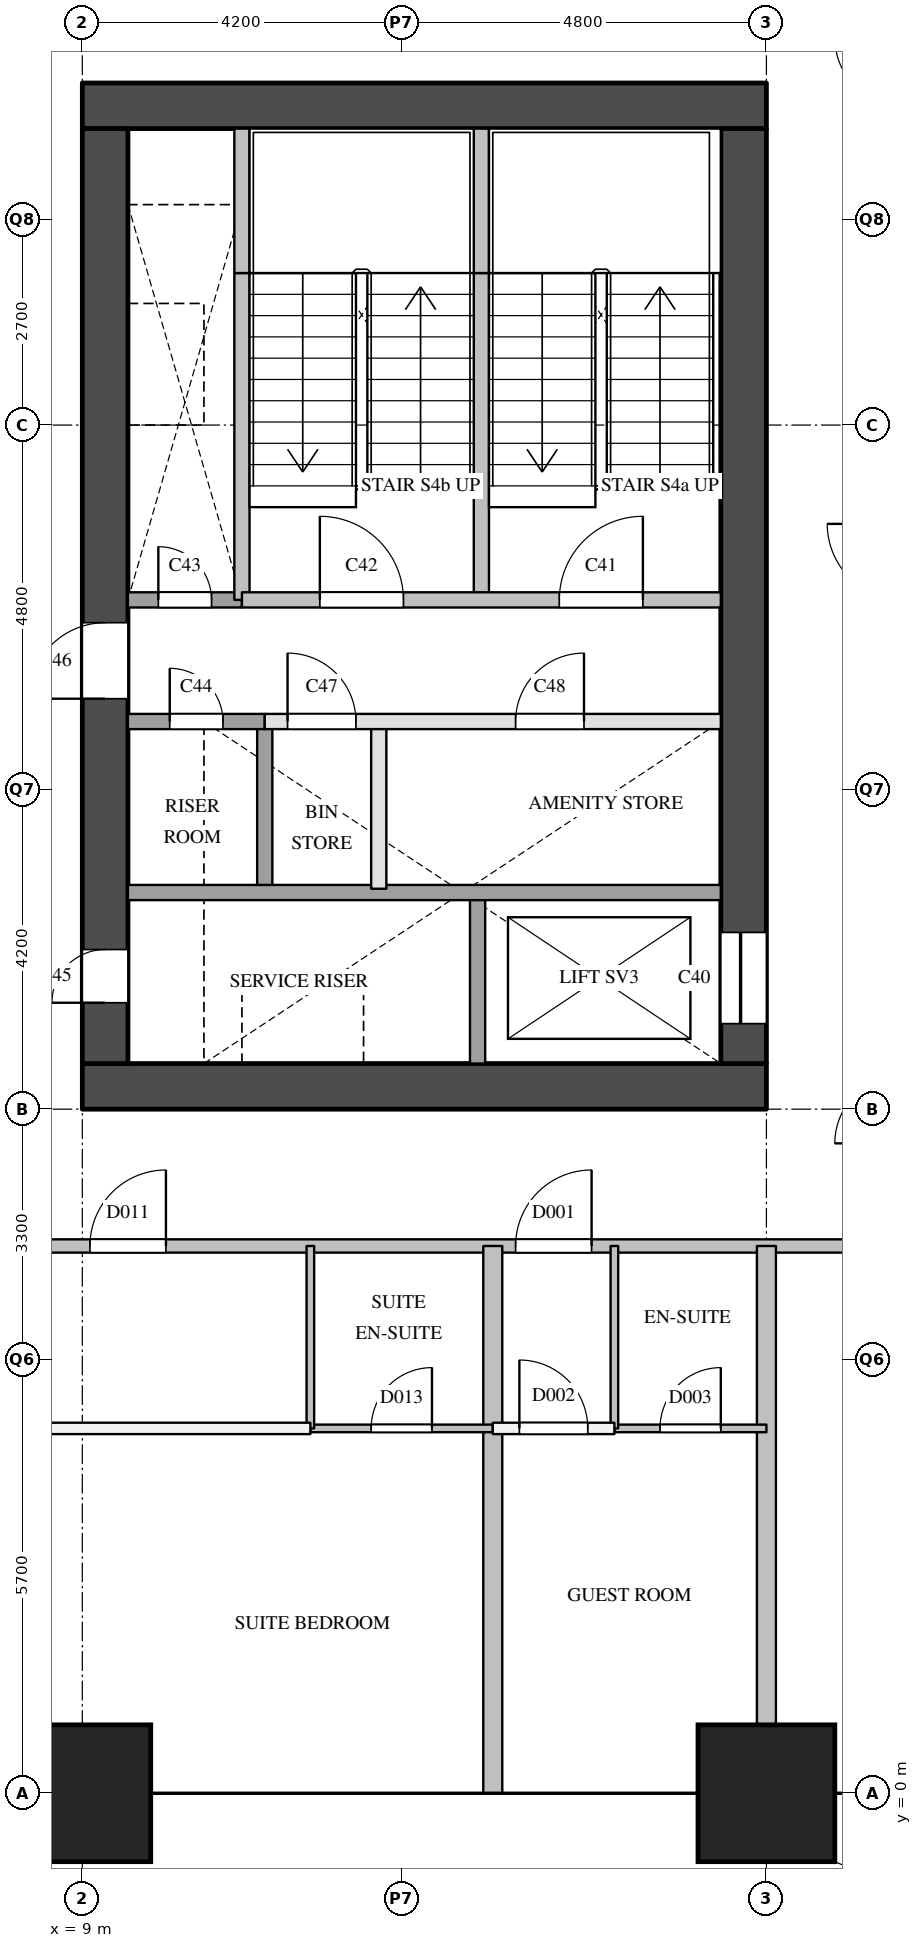
"""IFC4 building model, lengths in metres.
Left out: names, types, materials, properties, quantities, classifications, styles, units other than length and angle.
Written with IfcOpenShell. Run it as: python <this file> out.ifc"""

import sys

from ifc_helpers import new_model, si_unit, direction, frame, frame_2d, origin, origin_2d, place, context, subcontext, project, spatial, rectangle, extrude, element, fill, save


model = new_model("IFC4")
c1 = context("Model", 3, precision=1e-05, world=origin(), true_north=direction((0.0, 1.0)))
c2 = subcontext(c1, "Body", "Model", "MODEL_VIEW")
j1 = project(units=[si_unit("LENGTHUNIT", "METRE"), si_unit("PLANEANGLEUNIT", "RADIAN")], contexts=[c1])
p1 = place(None, origin())
s1 = spatial("IfcSite", under=j1, at=p1, CompositionType="ELEMENT")
p2 = place(p1, origin())
s2 = spatial("IfcBuilding", under=s1, at=p2, CompositionType="ELEMENT")
p3 = place(p2, frame((0.0, 0.0, 57.6)))
s3 = spatial("IfcBuildingStorey", under=s2, at=p3, CompositionType="ELEMENT", Elevation=57.6)
for number, where, z_axis, x_axis in (
    (1, (9.0, 0.0, 0.0), (0.0, 0.0, 1.0), (1.0, 0.0, 0.0)),
    (2, (18.0, 0.0, 0.0), (0.0, 0.0, 1.0), (1.0, 0.0, 0.0)),
):
    element("IfcColumn", number, at=place(p3, frame(where, z_axis=z_axis, x_axis=x_axis)), inside=s3, PredefinedType="COLUMN", context=c2, shape_type="SweptSolid", body=[
        extrude(rectangle(XDim=1.8, YDim=1.8, at=origin_2d()), origin(), (0.0, 0.0, 1.0), 3.8),
    ])
for number, where, z_axis, x_axis in (
    (3, (9.0, 9.3, 0.0), (0.0, 0.0, 1.0), (1.0, 0.0, 0.0)),
    (4, (9.0, 22.2, 0.0), (0.0, 0.0, 1.0), (1.0, 0.0, 0.0)),
):
    element("IfcWall", number, at=place(p3, frame(where, z_axis=z_axis, x_axis=x_axis)), inside=s3, PredefinedType="SHEAR", context=c2, shape_type="SweptSolid", body=[
        extrude(rectangle(XDim=9.0, YDim=0.6, at=frame_2d((4.5, 0.0))), origin(), (0.0, 0.0, 1.0), 3.5),
    ])
p4 = place(p3, frame((9.3, 9.6, 0.0), z_axis=(0.0, 0.0, 1.0), x_axis=(0.0, 1.0, 0.0)))
e5 = element("IfcWall", 5, at=p4, inside=s3, PredefinedType="SHEAR", context=c2, shape_type="SweptSolid", body=[
    extrude(rectangle(XDim=12.3, YDim=0.6, at=frame_2d((6.15, 0.0))), origin(), (0.0, 0.0, 1.0), 3.5),
])
p5 = place(p4, frame((0.8, 0.0, 0.0)))
e6 = element("IfcOpeningElement", 6, at=p5, cuts=e5, PredefinedType="OPENING", context=c2, shape_type="SweptSolid", body=[
    extrude(rectangle(XDim=0.7, YDim=2.1, at=frame_2d((0.35, 1.05))), frame((0.0, 0.31, 0.0), z_axis=(0.0, -1.0, 0.0), x_axis=(1.0, 0.0, 0.0)), (0.0, 0.0, 1.0), 0.62),
])
p6 = place(p4, frame((4.8, 0.0, 0.0)))
e7 = element("IfcOpeningElement", 7, at=p6, cuts=e5, PredefinedType="OPENING", context=c2, shape_type="SweptSolid", body=[
    extrude(rectangle(XDim=1.0, YDim=2.1, at=frame_2d((0.5, 1.05))), frame((0.0, 0.31, 0.0), z_axis=(0.0, -1.0, 0.0), x_axis=(1.0, 0.0, 0.0)), (0.0, 0.0, 1.0), 0.62),
])
p7 = place(p3, frame((17.7, 9.6, 0.0), z_axis=(0.0, 0.0, 1.0), x_axis=(0.0, 1.0, 0.0)))
e8 = element("IfcWall", 8, at=p7, inside=s3, PredefinedType="SHEAR", context=c2, shape_type="SweptSolid", body=[
    extrude(rectangle(XDim=12.3, YDim=0.6, at=frame_2d((6.15, 0.0))), origin(), (0.0, 0.0, 1.0), 3.5),
])
p8 = place(p7, frame((0.525, 0.0, 0.0)))
e9 = element("IfcOpeningElement", 9, at=p8, cuts=e8, PredefinedType="OPENING", context=c2, shape_type="SweptSolid", body=[
    extrude(rectangle(XDim=1.2, YDim=2.1, at=frame_2d((0.6, 1.05))), frame((0.0, 0.31, 0.0), z_axis=(0.0, -1.0, 0.0), x_axis=(1.0, 0.0, 0.0)), (0.0, 0.0, 1.0), 0.62),
])
p9 = place(p3, frame((11.1, 15.7, 0.0), z_axis=(0.0, 0.0, 1.0), x_axis=(0.0, 1.0, 0.0)))
e10 = element("IfcWall", 10, at=p9, inside=s3, PredefinedType="SOLIDWALL", context=c2, shape_type="SweptSolid", body=[
    extrude(rectangle(XDim=4.3, YDim=0.2, at=frame_2d((2.15, 0.0))), origin(), (0.0, 0.0, 1.0), 3.5),
])
p10 = place(p3, frame((11.1, 20.0, 0.0), z_axis=(0.0, 0.0, 1.0), x_axis=(0.0, 1.0, 0.0)))
e11 = element("IfcWall", 11, at=p10, inside=s3, PredefinedType="SOLIDWALL", context=c2, shape_type="SweptSolid", body=[
    extrude(rectangle(XDim=1.9, YDim=0.2, at=frame_2d((0.95, 0.0))), origin(), (0.0, 0.0, 1.0), 3.5),
])
p11 = place(p3, frame((11.4, 11.9, 0.0), z_axis=(0.0, 0.0, 1.0), x_axis=(0.0, 1.0, 0.0)))
e12 = element("IfcWall", 12, at=p11, inside=s3, PredefinedType="SOLIDWALL", context=c2, shape_type="SweptSolid", body=[
    extrude(rectangle(XDim=2.2, YDim=0.2, at=frame_2d((1.1, 0.0))), origin(), (0.0, 0.0, 1.0), 3.5),
])
p12 = place(p3, frame((12.9, 11.9, 0.0), z_axis=(0.0, 0.0, 1.0), x_axis=(0.0, 1.0, 0.0)))
e13 = element("IfcWall", 13, at=p12, inside=s3, PredefinedType="PARTITIONING", context=c2, shape_type="SweptSolid", body=[
    extrude(rectangle(XDim=2.2, YDim=0.2, at=frame_2d((1.1, 0.0))), origin(), (0.0, 0.0, 1.0), 3.5),
])
p13 = place(p3, frame((14.2, 9.6, 0.0), z_axis=(0.0, 0.0, 1.0), x_axis=(0.0, 1.0, 0.0)))
e14 = element("IfcWall", 14, at=p13, inside=s3, PredefinedType="SOLIDWALL", context=c2, shape_type="SweptSolid", body=[
    extrude(rectangle(XDim=2.3, YDim=0.2, at=frame_2d((1.15, 0.0))), origin(), (0.0, 0.0, 1.0), 3.5),
])
p14 = place(p3, frame((14.25, 15.7, 0.0), z_axis=(0.0, 0.0, 1.0), x_axis=(0.0, 1.0, 0.0)))
e15 = element("IfcWall", 15, at=p14, inside=s3, PredefinedType="SOLIDWALL", context=c2, shape_type="SweptSolid", body=[
    extrude(rectangle(XDim=4.3, YDim=0.2, at=frame_2d((2.15, 0.0))), origin(), (0.0, 0.0, 1.0), 3.5),
])
p15 = place(p3, frame((14.25, 20.0, 0.0), z_axis=(0.0, 0.0, 1.0), x_axis=(0.0, 1.0, 0.0)))
e16 = element("IfcWall", 16, at=p15, inside=s3, PredefinedType="SOLIDWALL", context=c2, shape_type="SweptSolid", body=[
    extrude(rectangle(XDim=1.9, YDim=0.2, at=frame_2d((0.95, 0.0))), origin(), (0.0, 0.0, 1.0), 3.5),
])
p16 = place(p3, frame((9.6, 11.85, 0.0), z_axis=(0.0, 0.0, 1.0), x_axis=(1.0, 0.0, 0.0)))
e17 = element("IfcWall", 17, at=p16, inside=s3, PredefinedType="SOLIDWALL", context=c2, shape_type="SweptSolid", body=[
    extrude(rectangle(XDim=7.8, YDim=0.2, at=frame_2d((3.9, 0.0))), origin(), (0.0, 0.0, 1.0), 3.5),
])
p17 = place(p3, frame((11.4, 14.1, 0.0), z_axis=(0.0, 0.0, 1.0), x_axis=(1.0, 0.0, 0.0)))
e18 = element("IfcWall", 18, at=p17, inside=s3, PredefinedType="PARTITIONING", context=c2, shape_type="SweptSolid", body=[
    extrude(rectangle(XDim=6.0, YDim=0.2, at=frame_2d((3.0, 0.0))), origin(), (0.0, 0.0, 1.0), 3.5),
])
p18 = place(p17, frame((0.3, 0.0, 0.0)))
e19 = element("IfcOpeningElement", 19, at=p18, cuts=e18, PredefinedType="OPENING", context=c2, shape_type="SweptSolid", body=[
    extrude(rectangle(XDim=0.9, YDim=2.1, at=frame_2d((0.45, 1.05))), frame((0.0, 0.11, 0.0), z_axis=(0.0, -1.0, 0.0), x_axis=(1.0, 0.0, 0.0)), (0.0, 0.0, 1.0), 0.22),
])
p19 = place(p17, frame((3.3, 0.0, 0.0)))
e20 = element("IfcOpeningElement", 20, at=p19, cuts=e18, PredefinedType="OPENING", context=c2, shape_type="SweptSolid", body=[
    extrude(rectangle(XDim=0.9, YDim=2.1, at=frame_2d((0.45, 1.05))), frame((0.0, 0.11, 0.0), z_axis=(0.0, -1.0, 0.0), x_axis=(1.0, 0.0, 0.0)), (0.0, 0.0, 1.0), 0.22),
])
p20 = place(p3, frame((9.6, 14.1, 0.0), z_axis=(0.0, 0.0, 1.0), x_axis=(1.0, 0.0, 0.0)))
e21 = element("IfcWall", 21, at=p20, inside=s3, PredefinedType="SOLIDWALL", context=c2, shape_type="SweptSolid", body=[
    extrude(rectangle(XDim=1.8, YDim=0.2, at=frame_2d((0.9, 0.0))), origin(), (0.0, 0.0, 1.0), 3.5),
])
p21 = place(p20, frame((0.55, 0.0, 0.0)))
e22 = element("IfcOpeningElement", 22, at=p21, cuts=e21, PredefinedType="OPENING", context=c2, shape_type="SweptSolid", body=[
    extrude(rectangle(XDim=0.7, YDim=2.1, at=frame_2d((0.35, 1.05))), frame((0.0, 0.11, 0.0), z_axis=(0.0, -1.0, 0.0), x_axis=(1.0, 0.0, 0.0)), (0.0, 0.0, 1.0), 0.22),
])
p22 = place(p3, frame((9.6, 15.7, 0.0), z_axis=(0.0, 0.0, 1.0), x_axis=(1.0, 0.0, 0.0)))
e23 = element("IfcWall", 23, at=p22, inside=s3, PredefinedType="SOLIDWALL", context=c2, shape_type="SweptSolid", body=[
    extrude(rectangle(XDim=1.5, YDim=0.2, at=frame_2d((0.75, 0.0))), origin(), (0.0, 0.0, 1.0), 3.5),
])
p23 = place(p22, frame((0.4, 0.0, 0.0)))
e24 = element("IfcOpeningElement", 24, at=p23, cuts=e23, PredefinedType="OPENING", context=c2, shape_type="SweptSolid", body=[
    extrude(rectangle(XDim=0.7, YDim=2.1, at=frame_2d((0.35, 1.05))), frame((0.0, 0.11, 0.0), z_axis=(0.0, -1.0, 0.0), x_axis=(1.0, 0.0, 0.0)), (0.0, 0.0, 1.0), 0.22),
])
p24 = place(p3, frame((11.1, 15.7, 0.0), z_axis=(0.0, 0.0, 1.0), x_axis=(1.0, 0.0, 0.0)))
e25 = element("IfcWall", 25, at=p24, inside=s3, PredefinedType="SOLIDWALL", context=c2, shape_type="SweptSolid", body=[
    extrude(rectangle(XDim=6.3, YDim=0.2, at=frame_2d((3.15, 0.0))), origin(), (0.0, 0.0, 1.0), 3.5),
])
p25 = place(p24, frame((4.175, 0.0, 0.0)))
e26 = element("IfcOpeningElement", 26, at=p25, cuts=e25, PredefinedType="OPENING", context=c2, shape_type="SweptSolid", body=[
    extrude(rectangle(XDim=1.1, YDim=2.1, at=frame_2d((0.55, 1.05))), frame((0.0, 0.11, 0.0), z_axis=(0.0, -1.0, 0.0), x_axis=(1.0, 0.0, 0.0)), (0.0, 0.0, 1.0), 0.22),
])
p26 = place(p24, frame((1.025, 0.0, 0.0)))
e27 = element("IfcOpeningElement", 27, at=p26, cuts=e25, PredefinedType="OPENING", context=c2, shape_type="SweptSolid", body=[
    extrude(rectangle(XDim=1.1, YDim=2.1, at=frame_2d((0.55, 1.05))), frame((0.0, 0.11, 0.0), z_axis=(0.0, -1.0, 0.0), x_axis=(1.0, 0.0, 0.0)), (0.0, 0.0, 1.0), 0.22),
])
p27 = place(p3, frame((7.2, 7.2, 0.0), z_axis=(0.0, 0.0, 1.0), x_axis=(1.0, 0.0, 0.0)))
e28 = element("IfcWall", 28, at=p27, inside=s3, PredefinedType="PARTITIONING", context=c2, shape_type="SweptSolid", body=[
    extrude(rectangle(XDim=12.6, YDim=0.175, at=frame_2d((6.3, 0.0))), origin(), (0.0, 0.0, 1.0), 3.5),
])
p28 = place(p27, frame((7.5, 0.0, 0.0)))
e29 = element("IfcOpeningElement", 29, at=p28, cuts=e28, PredefinedType="OPENING", context=c2, shape_type="SweptSolid", body=[
    extrude(rectangle(XDim=1.0, YDim=2.1, at=frame_2d((0.5, 1.05))), frame((0.0, 0.097, 0.0), z_axis=(0.0, -1.0, 0.0), x_axis=(1.0, 0.0, 0.0)), (0.0, 0.0, 1.0), 0.195),
])
p29 = place(p27, frame((1.9, 0.0, 0.0)))
e30 = element("IfcOpeningElement", 30, at=p29, cuts=e28, PredefinedType="OPENING", context=c2, shape_type="SweptSolid", body=[
    extrude(rectangle(XDim=1.0, YDim=2.1, at=frame_2d((0.5, 1.05))), frame((0.0, 0.097, 0.0), z_axis=(0.0, -1.0, 0.0), x_axis=(1.0, 0.0, 0.0)), (0.0, 0.0, 1.0), 0.195),
])
p30 = place(p3, frame((0.0, 4.8, 0.0), z_axis=(0.0, 0.0, 1.0), x_axis=(1.0, 0.0, 0.0)))
e31 = element("IfcWall", 31, at=p30, inside=s3, PredefinedType="PARTITIONING", context=c2, shape_type="SweptSolid", body=[
    extrude(rectangle(XDim=12.0, YDim=0.15, at=frame_2d((6.0, 0.0))), origin(), (0.0, 0.0, 1.0), 2.5),
])
p31 = place(p30, frame((5.55, 0.0, 0.0)))
e32 = element("IfcOpeningElement", 32, at=p31, cuts=e31, PredefinedType="OPENING", context=c2, shape_type="SweptSolid", body=[
    extrude(rectangle(XDim=0.9, YDim=2.1, at=frame_2d((0.45, 1.05))), frame((0.0, 0.085, 0.0), z_axis=(0.0, -1.0, 0.0), x_axis=(1.0, 0.0, 0.0)), (0.0, 0.0, 1.0), 0.17),
])
p32 = place(p3, frame((14.4, 4.8, 0.0), z_axis=(0.0, 0.0, 1.0), x_axis=(1.0, 0.0, 0.0)))
e33 = element("IfcWall", 33, at=p32, inside=s3, PredefinedType="PARTITIONING", context=c2, shape_type="SweptSolid", body=[
    extrude(rectangle(XDim=1.6, YDim=0.15, at=frame_2d((0.8, 0.0))), origin(), (0.0, 0.0, 1.0), 3.5),
])
p33 = place(p32, frame((0.35, 0.0, 0.0)))
e34 = element("IfcOpeningElement", 34, at=p33, cuts=e33, PredefinedType="OPENING", context=c2, shape_type="SweptSolid", body=[
    extrude(rectangle(XDim=0.9, YDim=2.1, at=frame_2d((0.45, 1.05))), frame((0.0, 0.085, 0.0), z_axis=(0.0, -1.0, 0.0), x_axis=(1.0, 0.0, 0.0)), (0.0, 0.0, 1.0), 0.17),
])
p34 = place(p3, frame((14.4, 0.0, 0.0), z_axis=(0.0, 0.0, 1.0), x_axis=(0.0, 1.0, 0.0)))
e35 = element("IfcWall", 35, at=p34, inside=s3, PredefinedType="PARTITIONING", context=c2, shape_type="SweptSolid", body=[
    extrude(rectangle(XDim=7.2, YDim=0.25, at=frame_2d((3.6, 0.0))), origin(), (0.0, 0.0, 1.0), 2.5),
])
p35 = place(p3, frame((18.0, 0.0, 0.0), z_axis=(0.0, 0.0, 1.0), x_axis=(0.0, 1.0, 0.0)))
e36 = element("IfcWall", 36, at=p35, inside=s3, PredefinedType="PARTITIONING", context=c2, shape_type="SweptSolid", body=[
    extrude(rectangle(XDim=7.2, YDim=0.25, at=frame_2d((3.6, 0.0))), origin(), (0.0, 0.0, 1.0), 3.5),
])
p36 = place(p3, frame((12.0, 4.8, 0.0), z_axis=(0.0, 0.0, 1.0), x_axis=(1.0, 0.0, 0.0)))
e37 = element("IfcWall", 37, at=p36, inside=s3, PredefinedType="PARTITIONING", context=c2, shape_type="SweptSolid", body=[
    extrude(rectangle(XDim=2.4, YDim=0.1, at=frame_2d((1.2, 0.0))), origin(), (0.0, 0.0, 1.0), 3.5),
])
p37 = place(p36, frame((0.8, 0.0, 0.0)))
e38 = element("IfcOpeningElement", 38, at=p37, cuts=e37, PredefinedType="OPENING", context=c2, shape_type="SweptSolid", body=[
    extrude(rectangle(XDim=0.8, YDim=2.1, at=frame_2d((0.4, 1.05))), frame((0.0, 0.06, 0.0), z_axis=(0.0, -1.0, 0.0), x_axis=(1.0, 0.0, 0.0)), (0.0, 0.0, 1.0), 0.12),
])
p38 = place(p3, frame((16.0, 4.8, 0.0), z_axis=(0.0, 0.0, 1.0), x_axis=(1.0, 0.0, 0.0)))
e39 = element("IfcWall", 39, at=p38, inside=s3, PredefinedType="PARTITIONING", context=c2, shape_type="SweptSolid", body=[
    extrude(rectangle(XDim=2.0, YDim=0.1, at=frame_2d((1.0, 0.0))), origin(), (0.0, 0.0, 1.0), 3.5),
])
p39 = place(p38, frame((0.6, 0.0, 0.0)))
e40 = element("IfcOpeningElement", 40, at=p39, cuts=e39, PredefinedType="OPENING", context=c2, shape_type="SweptSolid", body=[
    extrude(rectangle(XDim=0.8, YDim=2.1, at=frame_2d((0.4, 1.05))), frame((0.0, 0.06, 0.0), z_axis=(0.0, -1.0, 0.0), x_axis=(1.0, 0.0, 0.0)), (0.0, 0.0, 1.0), 0.12),
])
for number, where, z_axis, x_axis in (
    (41, (12.0, 4.8, 0.0), (0.0, 0.0, 1.0), (0.0, 1.0, 0.0)),
    (42, (16.0, 4.8, 0.0), (0.0, 0.0, 1.0), (0.0, 1.0, 0.0)),
):
    element("IfcWall", number, at=place(p3, frame(where, z_axis=z_axis, x_axis=x_axis)), inside=s3, PredefinedType="PARTITIONING", context=c2, shape_type="SweptSolid", body=[
        extrude(rectangle(XDim=2.4, YDim=0.1, at=frame_2d((1.2, 0.0))), origin(), (0.0, 0.0, 1.0), 3.5),
    ])
p40 = place(p8, origin())
e43 = element("IfcDoor", 43, at=p40, inside=s3, OperationType="SLIDING_TO_LEFT", PredefinedType="DOOR", context=c2, shape_type="SweptSolid", body=[
    extrude(rectangle(XDim=1.2, YDim=2.1, at=frame_2d((0.6, 1.05))), frame((0.0, 0.025, 0.0), z_axis=(0.0, -1.0, 0.0), x_axis=(1.0, 0.0, 0.0)), (0.0, 0.0, 1.0), 0.05),
])
fill(e9, e43)
p41 = place(p25, origin())
e44 = element("IfcDoor", 44, at=p41, inside=s3, OperationType="SINGLE_SWING_RIGHT", PredefinedType="DOOR", context=c2, shape_type="SweptSolid", body=[
    extrude(rectangle(XDim=1.1, YDim=2.1, at=frame_2d((0.55, 1.05))), frame((0.0, 0.025, 0.0), z_axis=(0.0, -1.0, 0.0), x_axis=(1.0, 0.0, 0.0)), (0.0, 0.0, 1.0), 0.05),
])
fill(e26, e44)
p42 = place(p26, origin())
e45 = element("IfcDoor", 45, at=p42, inside=s3, OperationType="SINGLE_SWING_LEFT", PredefinedType="DOOR", context=c2, shape_type="SweptSolid", body=[
    extrude(rectangle(XDim=1.1, YDim=2.1, at=frame_2d((0.55, 1.05))), frame((0.0, 0.025, 0.0), z_axis=(0.0, -1.0, 0.0), x_axis=(1.0, 0.0, 0.0)), (0.0, 0.0, 1.0), 0.05),
])
fill(e27, e45)
p43 = place(p23, origin())
e46 = element("IfcDoor", 46, at=p43, inside=s3, OperationType="SINGLE_SWING_LEFT", PredefinedType="DOOR", context=c2, shape_type="SweptSolid", body=[
    extrude(rectangle(XDim=0.7, YDim=2.1, at=frame_2d((0.35, 1.05))), frame((0.0, 0.025, 0.0), z_axis=(0.0, -1.0, 0.0), x_axis=(1.0, 0.0, 0.0)), (0.0, 0.0, 1.0), 0.05),
])
fill(e24, e46)
p44 = place(p21, origin())
e47 = element("IfcDoor", 47, at=p44, inside=s3, OperationType="SINGLE_SWING_LEFT", PredefinedType="DOOR", context=c2, shape_type="SweptSolid", body=[
    extrude(rectangle(XDim=0.7, YDim=2.1, at=frame_2d((0.35, 1.05))), frame((0.0, 0.025, 0.0), z_axis=(0.0, -1.0, 0.0), x_axis=(1.0, 0.0, 0.0)), (0.0, 0.0, 1.0), 0.05),
])
fill(e22, e47)
p45 = place(p5, origin())
e48 = element("IfcDoor", 48, at=p45, inside=s3, OperationType="SINGLE_SWING_LEFT", PredefinedType="DOOR", context=c2, shape_type="SweptSolid", body=[
    extrude(rectangle(XDim=0.7, YDim=2.1, at=frame_2d((0.35, 1.05))), frame((0.0, 0.025, 0.0), z_axis=(0.0, -1.0, 0.0), x_axis=(1.0, 0.0, 0.0)), (0.0, 0.0, 1.0), 0.05),
])
fill(e6, e48)
p46 = place(p6, origin())
e49 = element("IfcDoor", 49, at=p46, inside=s3, OperationType="SINGLE_SWING_LEFT", PredefinedType="DOOR", context=c2, shape_type="SweptSolid", body=[
    extrude(rectangle(XDim=1.0, YDim=2.1, at=frame_2d((0.5, 1.05))), frame((0.0, 0.025, 0.0), z_axis=(0.0, -1.0, 0.0), x_axis=(1.0, 0.0, 0.0)), (0.0, 0.0, 1.0), 0.05),
])
fill(e7, e49)
p47 = place(p18, origin())
e50 = element("IfcDoor", 50, at=p47, inside=s3, OperationType="SINGLE_SWING_LEFT", PredefinedType="DOOR", context=c2, shape_type="SweptSolid", body=[
    extrude(rectangle(XDim=0.9, YDim=2.1, at=frame_2d((0.45, 1.05))), frame((0.0, 0.025, 0.0), z_axis=(0.0, -1.0, 0.0), x_axis=(1.0, 0.0, 0.0)), (0.0, 0.0, 1.0), 0.05),
])
fill(e19, e50)
p48 = place(p19, origin())
e51 = element("IfcDoor", 51, at=p48, inside=s3, OperationType="SINGLE_SWING_RIGHT", PredefinedType="DOOR", context=c2, shape_type="SweptSolid", body=[
    extrude(rectangle(XDim=0.9, YDim=2.1, at=frame_2d((0.45, 1.05))), frame((0.0, 0.025, 0.0), z_axis=(0.0, -1.0, 0.0), x_axis=(1.0, 0.0, 0.0)), (0.0, 0.0, 1.0), 0.05),
])
fill(e20, e51)
p49 = place(p28, origin())
e52 = element("IfcDoor", 52, at=p49, inside=s3, OperationType="SINGLE_SWING_RIGHT", PredefinedType="DOOR", context=c2, shape_type="SweptSolid", body=[
    extrude(rectangle(XDim=1.0, YDim=2.1, at=frame_2d((0.5, 1.05))), frame((0.0, 0.025, 0.0), z_axis=(0.0, -1.0, 0.0), x_axis=(1.0, 0.0, 0.0)), (0.0, 0.0, 1.0), 0.05),
])
fill(e29, e52)
p50 = place(p33, origin())
e53 = element("IfcDoor", 53, at=p50, inside=s3, OperationType="SINGLE_SWING_LEFT", PredefinedType="DOOR", context=c2, shape_type="SweptSolid", body=[
    extrude(rectangle(XDim=0.9, YDim=2.1, at=frame_2d((0.45, 1.05))), frame((0.0, 0.025, 0.0), z_axis=(0.0, -1.0, 0.0), x_axis=(1.0, 0.0, 0.0)), (0.0, 0.0, 1.0), 0.05),
])
fill(e34, e53)
p51 = place(p39, origin())
e54 = element("IfcDoor", 54, at=p51, inside=s3, OperationType="SINGLE_SWING_RIGHT", PredefinedType="DOOR", context=c2, shape_type="SweptSolid", body=[
    extrude(rectangle(XDim=0.8, YDim=2.1, at=frame_2d((0.4, 1.05))), frame((0.0, 0.025, 0.0), z_axis=(0.0, -1.0, 0.0), x_axis=(1.0, 0.0, 0.0)), (0.0, 0.0, 1.0), 0.05),
])
fill(e40, e54)
p52 = place(p29, origin())
e55 = element("IfcDoor", 55, at=p52, inside=s3, OperationType="SINGLE_SWING_RIGHT", PredefinedType="DOOR", context=c2, shape_type="SweptSolid", body=[
    extrude(rectangle(XDim=1.0, YDim=2.1, at=frame_2d((0.5, 1.05))), frame((0.0, 0.025, 0.0), z_axis=(0.0, -1.0, 0.0), x_axis=(1.0, 0.0, 0.0)), (0.0, 0.0, 1.0), 0.05),
])
fill(e30, e55)
p53 = place(p37, origin())
e56 = element("IfcDoor", 56, at=p53, inside=s3, OperationType="SINGLE_SWING_RIGHT", PredefinedType="DOOR", context=c2, shape_type="SweptSolid", body=[
    extrude(rectangle(XDim=0.8, YDim=2.1, at=frame_2d((0.4, 1.05))), frame((0.0, 0.025, 0.0), z_axis=(0.0, -1.0, 0.0), x_axis=(1.0, 0.0, 0.0)), (0.0, 0.0, 1.0), 0.05),
])
fill(e38, e56)
save(model, sys.argv[1])
